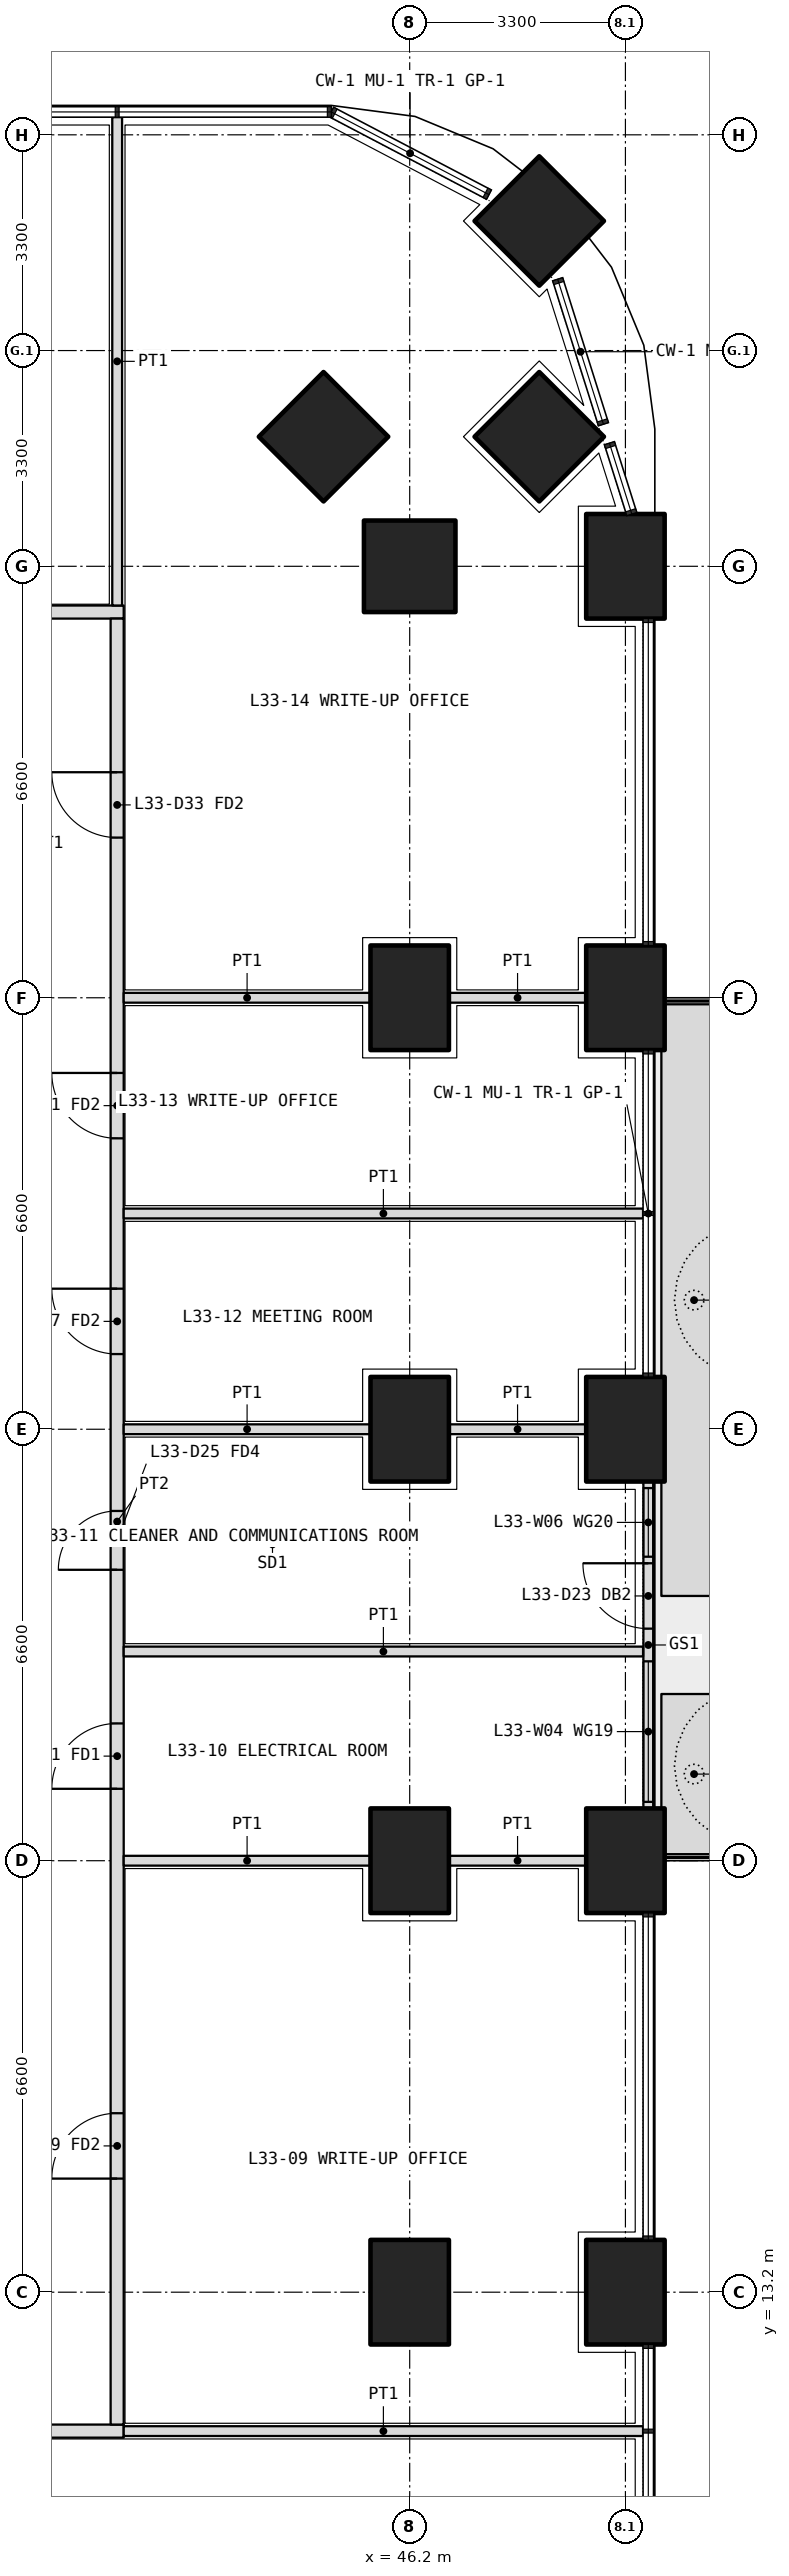
"""IFC4 building model, lengths in metres.
Left out: names, types, materials, properties, quantities, classifications, styles, units other than length and angle.
Written with IfcOpenShell. Run it as: python <this file> out.ifc"""

import sys

from ifc_helpers import new_model, si_unit, direction, frame, frame_2d, origin, origin_2d, place, context, subcontext, project, spatial, polyline, rectangle, outline, extrude, element, fill, save


model = new_model("IFC4")
c1 = context("Model", 3, precision=1e-05, world=origin(), true_north=direction((0.0, 1.0)))
c2 = subcontext(c1, "Body", "Model", "MODEL_VIEW")
j1 = project(units=[si_unit("LENGTHUNIT", "METRE"), si_unit("PLANEANGLEUNIT", "RADIAN")], contexts=[c1])
p1 = place(None, origin())
s1 = spatial("IfcSite", under=j1, at=p1, CompositionType="ELEMENT")
p2 = place(p1, origin())
s2 = spatial("IfcBuilding", under=s1, at=p2, CompositionType="ELEMENT")
p3 = place(p2, frame((0.0, 0.0, 145.2)))
s3 = spatial("IfcBuildingStorey", under=s2, at=p3, CompositionType="ELEMENT", Elevation=145.2)
p4 = place(p3, frame((48.182, 44.882, 0.0), z_axis=(0.0, 0.0, 1.0), x_axis=(0.707106781187, 0.707106781187, 0.0)))
e1 = element("IfcColumn", 1, at=p4, inside=s3, PredefinedType="COLUMN", context=c2, shape_type="SweptSolid", body=[
    extrude(rectangle(XDim=1.4, YDim=1.4, at=origin_2d()), origin(), (0.0, 0.0, 1.0), 4.2),
])
for number, where, z_axis, x_axis in (
    (2, (49.5, 13.2, 0.0), (0.0, 0.0, 1.0), (0.0, 1.0, 0.0)),
    (3, (49.5, 19.8, 0.0), (0.0, 0.0, 1.0), (0.0, 1.0, 0.0)),
    (4, (49.5, 26.4, 0.0), (0.0, 0.0, 1.0), (0.0, 1.0, 0.0)),
    (5, (49.5, 33.0, 0.0), (0.0, 0.0, 1.0), (0.0, 1.0, 0.0)),
    (6, (49.5, 39.6, 0.0), (0.0, 0.0, 1.0), (0.0, 1.0, 0.0)),
):
    element("IfcColumn", number, at=place(p3, frame(where, z_axis=z_axis, x_axis=x_axis)), inside=s3, PredefinedType="COLUMN", context=c2, shape_type="SweptSolid", body=[
        extrude(rectangle(XDim=1.6, YDim=1.2, at=origin_2d()), origin(), (0.0, 0.0, 1.0), 4.2),
    ])
for number, where, z_axis, x_axis in (
    (7, (46.2, 39.6, 0.0), (0.0, 0.0, 1.0), (1.0, 0.0, 0.0)),
    (8, (48.182, 41.582, 0.0), (0.0, 0.0, 1.0), (0.707, 0.707, 0.0)),
    (9, (44.882, 41.582, 0.0), (0.0, 0.0, 1.0), (0.707, 0.707, 0.0)),
):
    element("IfcColumn", number, at=place(p3, frame(where, z_axis=z_axis, x_axis=x_axis)), inside=s3, PredefinedType="COLUMN", context=c2, shape_type="SweptSolid", body=[
        extrude(rectangle(XDim=1.4, YDim=1.4, at=origin_2d()), origin(), (0.0, 0.0, 1.0), 4.2),
    ])
for number, where, z_axis, x_axis in (
    (10, (46.2, 13.2, 0.0), (0.0, 0.0, 1.0), (0.0, 1.0, 0.0)),
    (11, (46.2, 19.8, 0.0), (0.0, 0.0, 1.0), (0.0, 1.0, 0.0)),
    (12, (46.2, 26.4, 0.0), (0.0, 0.0, 1.0), (0.0, 1.0, 0.0)),
    (13, (46.2, 33.0, 0.0), (0.0, 0.0, 1.0), (0.0, 1.0, 0.0)),
):
    element("IfcColumn", number, at=place(p3, frame(where, z_axis=z_axis, x_axis=x_axis)), inside=s3, PredefinedType="COLUMN", context=c2, shape_type="SweptSolid", body=[
        extrude(rectangle(XDim=1.6, YDim=1.2, at=origin_2d()), origin(), (0.0, 0.0, 1.0), 4.2),
    ])
p5 = place(p3, origin())
e14 = element("IfcWall", 14, at=p5, inside=s3, PredefinedType="USERDEFINED", context=c2, shape_type="SweptSolid", body=[
    extrude(outline(polyline([(50.05, 19.9), (51.05, 19.9), (51.05, 22.35), (50.05, 22.35), (50.05, 19.9)]), holes=[polyline([(50.2, 20.05), (50.9, 20.05), (50.9, 22.2), (50.2, 22.2), (50.2, 20.05)])]), origin(), (0.0, 0.0, 1.0), 1.05),
])
p6 = place(p3, origin())
e15 = element("IfcWall", 15, at=p6, inside=s3, PredefinedType="USERDEFINED", context=c2, shape_type="SweptSolid", body=[
    extrude(outline(polyline([(50.05, 23.85), (51.05, 23.85), (51.05, 32.9), (50.05, 32.9), (50.05, 23.85)]), holes=[polyline([(50.2, 24.0), (50.9, 24.0), (50.9, 32.75), (50.2, 32.75), (50.2, 24.0)])]), origin(), (0.0, 0.0, 1.0), 1.05),
])
p7 = place(p3, frame((49.85, 20.6, 0.0), z_axis=(0.0, 0.0, 1.0), x_axis=(0.0, 1.0, 0.0)))
e16 = element("IfcWall", 16, at=p7, inside=s3, PredefinedType="SOLIDWALL", context=c2, shape_type="SweptSolid", body=[
    extrude(rectangle(XDim=5.0, YDim=0.15, at=frame_2d((2.5, 0.0))), origin(), (0.0, 0.0, 1.0), 2.05),
])
p8 = place(p7, frame((2.75, 0.0, 0.0)))
e17 = element("IfcOpeningElement", 17, at=p8, cuts=e16, PredefinedType="OPENING", context=c2, shape_type="SweptSolid", body=[
    extrude(rectangle(XDim=1.0, YDim=2.0, at=frame_2d((0.5, 1.0))), frame((0.0, 0.085, 0.0), z_axis=(0.0, -1.0, 0.0), x_axis=(1.0, 0.0, 0.0)), (0.0, 0.0, 1.0), 0.17),
])
p9 = place(p7, frame((0.1, 0.0, 0.1)))
e18 = element("IfcOpeningElement", 18, at=p9, cuts=e16, PredefinedType="OPENING", context=c2, shape_type="SweptSolid", body=[
    extrude(rectangle(XDim=2.15, YDim=1.65, at=frame_2d((1.075, 0.825))), frame((0.0, 0.085, 0.0), z_axis=(0.0, -1.0, 0.0), x_axis=(1.0, 0.0, 0.0)), (0.0, 0.0, 1.0), 0.17),
])
p10 = place(p7, frame((3.85, 0.0, 0.1)))
e19 = element("IfcOpeningElement", 19, at=p10, cuts=e16, PredefinedType="OPENING", context=c2, shape_type="SweptSolid", body=[
    extrude(rectangle(XDim=1.05, YDim=1.65, at=frame_2d((0.525, 0.825))), frame((0.0, 0.085, 0.0), z_axis=(0.0, -1.0, 0.0), x_axis=(1.0, 0.0, 0.0)), (0.0, 0.0, 1.0), 0.17),
])
p11 = place(p3, frame((10.975, 11.075, 0.0), z_axis=(0.0, 0.0, 1.0), x_axis=(1.0, 0.0, 0.0)))
e20 = element("IfcWall", 20, at=p11, inside=s3, PredefinedType="PARTITIONING", context=c2, shape_type="SweptSolid", body=[
    extrude(rectangle(XDim=30.85, YDim=0.2, at=frame_2d((15.425, 0.0))), origin(), (0.0, 0.0, 1.0), 2.55),
])
p12 = place(p11, frame((0.663, 0.0, 0.0)))
e21 = element("IfcOpeningElement", 21, at=p12, cuts=e20, PredefinedType="OPENING", context=c2, shape_type="SweptSolid", body=[
    extrude(rectangle(XDim=1.0, YDim=2.1, at=frame_2d((0.5, 1.05))), frame((0.0, 0.11, 0.0), z_axis=(0.0, -1.0, 0.0), x_axis=(1.0, 0.0, 0.0)), (0.0, 0.0, 1.0), 0.22),
])
p13 = place(p11, frame((3.825, 0.0, 0.0)))
e22 = element("IfcOpeningElement", 22, at=p13, cuts=e20, PredefinedType="OPENING", context=c2, shape_type="SweptSolid", body=[
    extrude(rectangle(XDim=1.0, YDim=2.1, at=frame_2d((0.5, 1.05))), frame((0.0, 0.11, 0.0), z_axis=(0.0, -1.0, 0.0), x_axis=(1.0, 0.0, 0.0)), (0.0, 0.0, 1.0), 0.22),
])
p14 = place(p11, frame((7.125, 0.0, 0.0)))
e23 = element("IfcOpeningElement", 23, at=p14, cuts=e20, PredefinedType="OPENING", context=c2, shape_type="SweptSolid", body=[
    extrude(rectangle(XDim=1.0, YDim=2.1, at=frame_2d((0.5, 1.05))), frame((0.0, 0.11, 0.0), z_axis=(0.0, -1.0, 0.0), x_axis=(1.0, 0.0, 0.0)), (0.0, 0.0, 1.0), 0.22),
])
p15 = place(p11, frame((19.188, 0.0, 0.0)))
e24 = element("IfcOpeningElement", 24, at=p15, cuts=e20, PredefinedType="OPENING", context=c2, shape_type="SweptSolid", body=[
    extrude(rectangle(XDim=1.2, YDim=2.1, at=frame_2d((0.6, 1.05))), frame((0.0, 0.11, 0.0), z_axis=(0.0, -1.0, 0.0), x_axis=(1.0, 0.0, 0.0)), (0.0, 0.0, 1.0), 0.22),
])
p16 = place(p3, frame((19.8, 38.9, 0.0), z_axis=(0.0, 0.0, 1.0), x_axis=(1.0, 0.0, 0.0)))
e25 = element("IfcWall", 25, at=p16, inside=s3, PredefinedType="PARTITIONING", context=c2, shape_type="SweptSolid", body=[
    extrude(rectangle(XDim=22.025, YDim=0.2, at=frame_2d((11.012, 0.0))), origin(), (0.0, 0.0, 1.0), 2.55),
])
p17 = place(p16, frame((6.1, 0.0, 0.0)))
e26 = element("IfcOpeningElement", 26, at=p17, cuts=e25, PredefinedType="OPENING", context=c2, shape_type="SweptSolid", body=[
    extrude(rectangle(XDim=1.0, YDim=2.1, at=frame_2d((0.5, 1.05))), frame((0.0, 0.11, 0.0), z_axis=(0.0, -1.0, 0.0), x_axis=(1.0, 0.0, 0.0)), (0.0, 0.0, 1.0), 0.22),
])
p18 = place(p16, frame((16.962, 0.0, 0.0)))
e27 = element("IfcOpeningElement", 27, at=p18, cuts=e25, PredefinedType="OPENING", context=c2, shape_type="SweptSolid", body=[
    extrude(rectangle(XDim=1.2, YDim=2.1, at=frame_2d((0.6, 1.05))), frame((0.0, 0.11, 0.0), z_axis=(0.0, -1.0, 0.0), x_axis=(1.0, 0.0, 0.0)), (0.0, 0.0, 1.0), 0.22),
])
p19 = place(p3, frame((41.725, 11.175, 0.0), z_axis=(0.0, 0.0, 1.0), x_axis=(0.0, 1.0, 0.0)))
e28 = element("IfcWall", 28, at=p19, inside=s3, PredefinedType="PARTITIONING", context=c2, shape_type="SweptSolid", body=[
    extrude(rectangle(XDim=27.625, YDim=0.2, at=frame_2d((13.812, 0.0))), origin(), (0.0, 0.0, 1.0), 2.55),
])
p20 = place(p19, frame((3.762, 0.0, 0.0)))
e29 = element("IfcOpeningElement", 29, at=p20, cuts=e28, PredefinedType="OPENING", context=c2, shape_type="SweptSolid", body=[
    extrude(rectangle(XDim=1.0, YDim=2.1, at=frame_2d((0.5, 1.05))), frame((0.0, 0.11, 0.0), z_axis=(0.0, -1.0, 0.0), x_axis=(1.0, 0.0, 0.0)), (0.0, 0.0, 1.0), 0.22),
])
p21 = place(p19, frame((9.725, 0.0, 0.0)))
e30 = element("IfcOpeningElement", 30, at=p21, cuts=e28, PredefinedType="OPENING", context=c2, shape_type="SweptSolid", body=[
    extrude(rectangle(XDim=1.0, YDim=2.1, at=frame_2d((0.5, 1.05))), frame((0.0, 0.11, 0.0), z_axis=(0.0, -1.0, 0.0), x_axis=(1.0, 0.0, 0.0)), (0.0, 0.0, 1.0), 0.22),
])
p22 = place(p19, frame((13.075, 0.0, 0.0)))
e31 = element("IfcOpeningElement", 31, at=p22, cuts=e28, PredefinedType="OPENING", context=c2, shape_type="SweptSolid", body=[
    extrude(rectangle(XDim=0.9, YDim=2.1, at=frame_2d((0.45, 1.05))), frame((0.0, 0.11, 0.0), z_axis=(0.0, -1.0, 0.0), x_axis=(1.0, 0.0, 0.0)), (0.0, 0.0, 1.0), 0.22),
])
p23 = place(p19, frame((16.375, 0.0, 0.0)))
e32 = element("IfcOpeningElement", 32, at=p23, cuts=e28, PredefinedType="OPENING", context=c2, shape_type="SweptSolid", body=[
    extrude(rectangle(XDim=1.0, YDim=2.1, at=frame_2d((0.5, 1.05))), frame((0.0, 0.11, 0.0), z_axis=(0.0, -1.0, 0.0), x_axis=(1.0, 0.0, 0.0)), (0.0, 0.0, 1.0), 0.22),
])
p24 = place(p19, frame((19.675, 0.0, 0.0)))
e33 = element("IfcOpeningElement", 33, at=p24, cuts=e28, PredefinedType="OPENING", context=c2, shape_type="SweptSolid", body=[
    extrude(rectangle(XDim=1.0, YDim=2.1, at=frame_2d((0.5, 1.05))), frame((0.0, 0.11, 0.0), z_axis=(0.0, -1.0, 0.0), x_axis=(1.0, 0.0, 0.0)), (0.0, 0.0, 1.0), 0.22),
])
p25 = place(p19, frame((24.275, 0.0, 0.0)))
e34 = element("IfcOpeningElement", 34, at=p25, cuts=e28, PredefinedType="OPENING", context=c2, shape_type="SweptSolid", body=[
    extrude(rectangle(XDim=1.0, YDim=2.1, at=frame_2d((0.5, 1.05))), frame((0.0, 0.11, 0.0), z_axis=(0.0, -1.0, 0.0), x_axis=(1.0, 0.0, 0.0)), (0.0, 0.0, 1.0), 0.22),
])
p26 = place(p3, frame((49.77, 11.075, 0.0), z_axis=(0.0, 0.0, 1.0), x_axis=(-1.0, 0.0, 0.0)))
e35 = element("IfcWall", 35, at=p26, inside=s3, PredefinedType="PARTITIONING", context=c2, shape_type="SweptSolid", body=[
    extrude(rectangle(XDim=7.945, YDim=0.15, at=frame_2d((3.973, 0.0))), origin(), (0.0, 0.0, 1.0), 3.85),
])
p27 = place(p3, frame((41.725, 46.47, 0.0), z_axis=(0.0, 0.0, 1.0), x_axis=(0.0, -1.0, 0.0)))
e36 = element("IfcWall", 36, at=p27, inside=s3, PredefinedType="PARTITIONING", context=c2, shape_type="SweptSolid", body=[
    extrude(rectangle(XDim=7.47, YDim=0.15, at=frame_2d((3.735, 0.0))), origin(), (0.0, 0.0, 1.0), 3.85),
])
p28 = place(p3, frame((49.77, 23.0, 0.0), z_axis=(0.0, 0.0, 1.0), x_axis=(-1.0, 0.0, 0.0)))
e37 = element("IfcWall", 37, at=p28, inside=s3, PredefinedType="PARTITIONING", context=c2, shape_type="SweptSolid", body=[
    extrude(rectangle(XDim=7.945, YDim=0.15, at=frame_2d((3.973, 0.0))), origin(), (0.0, 0.0, 1.0), 3.85),
])
p29 = place(p3, frame((48.9, 26.4, 0.0), z_axis=(0.0, 0.0, 1.0), x_axis=(-1.0, 0.0, 0.0)))
e38 = element("IfcWall", 38, at=p29, inside=s3, PredefinedType="PARTITIONING", context=c2, shape_type="SweptSolid", body=[
    extrude(rectangle(XDim=2.1, YDim=0.15, at=frame_2d((1.05, 0.0))), origin(), (0.0, 0.0, 1.0), 2.55),
])
p30 = place(p3, frame((45.6, 26.4, 0.0), z_axis=(0.0, 0.0, 1.0), x_axis=(-1.0, 0.0, 0.0)))
e39 = element("IfcWall", 39, at=p30, inside=s3, PredefinedType="PARTITIONING", context=c2, shape_type="SweptSolid", body=[
    extrude(rectangle(XDim=3.775, YDim=0.15, at=frame_2d((1.888, 0.0))), origin(), (0.0, 0.0, 1.0), 2.55),
])
p31 = place(p3, frame((48.9, 19.8, 0.0), z_axis=(0.0, 0.0, 1.0), x_axis=(-1.0, 0.0, 0.0)))
e40 = element("IfcWall", 40, at=p31, inside=s3, PredefinedType="PARTITIONING", context=c2, shape_type="SweptSolid", body=[
    extrude(rectangle(XDim=2.1, YDim=0.15, at=frame_2d((1.05, 0.0))), origin(), (0.0, 0.0, 1.0), 2.55),
])
p32 = place(p3, frame((45.6, 19.8, 0.0), z_axis=(0.0, 0.0, 1.0), x_axis=(-1.0, 0.0, 0.0)))
e41 = element("IfcWall", 41, at=p32, inside=s3, PredefinedType="PARTITIONING", context=c2, shape_type="SweptSolid", body=[
    extrude(rectangle(XDim=3.775, YDim=0.15, at=frame_2d((1.888, 0.0))), origin(), (0.0, 0.0, 1.0), 2.55),
])
p33 = place(p3, frame((49.77, 29.7, 0.0), z_axis=(0.0, 0.0, 1.0), x_axis=(-1.0, 0.0, 0.0)))
e42 = element("IfcWall", 42, at=p33, inside=s3, PredefinedType="PARTITIONING", context=c2, shape_type="SweptSolid", body=[
    extrude(rectangle(XDim=7.945, YDim=0.15, at=frame_2d((3.973, 0.0))), origin(), (0.0, 0.0, 1.0), 3.85),
])
p34 = place(p3, frame((48.9, 33.0, 0.0), z_axis=(0.0, 0.0, 1.0), x_axis=(-1.0, 0.0, 0.0)))
e43 = element("IfcWall", 43, at=p34, inside=s3, PredefinedType="PARTITIONING", context=c2, shape_type="SweptSolid", body=[
    extrude(rectangle(XDim=2.1, YDim=0.15, at=frame_2d((1.05, 0.0))), origin(), (0.0, 0.0, 1.0), 2.55),
])
p35 = place(p3, frame((45.6, 33.0, 0.0), z_axis=(0.0, 0.0, 1.0), x_axis=(-1.0, 0.0, 0.0)))
e44 = element("IfcWall", 44, at=p35, inside=s3, PredefinedType="PARTITIONING", context=c2, shape_type="SweptSolid", body=[
    extrude(rectangle(XDim=3.775, YDim=0.15, at=frame_2d((1.888, 0.0))), origin(), (0.0, 0.0, 1.0), 2.55),
])
p36 = place(p8, origin())
e45 = element("IfcDoor", 45, at=p36, inside=s3, OperationType="SINGLE_SWING_RIGHT", PredefinedType="DOOR", context=c2, shape_type="SweptSolid", body=[
    extrude(rectangle(XDim=1.0, YDim=2.0, at=frame_2d((0.5, 1.0))), frame((0.0, 0.025, 0.0), z_axis=(0.0, -1.0, 0.0), x_axis=(1.0, 0.0, 0.0)), (0.0, 0.0, 1.0), 0.05),
])
fill(e17, e45)
p37 = place(p9, origin())
e46 = element("IfcWindow", 46, at=p37, inside=s3, PartitioningType="SINGLE_PANEL", PredefinedType="WINDOW", context=c2, shape_type="SweptSolid", body=[
    extrude(rectangle(XDim=2.15, YDim=1.65, at=frame_2d((1.075, 0.825))), frame((0.0, 0.03, 0.0), z_axis=(0.0, -1.0, 0.0), x_axis=(1.0, 0.0, 0.0)), (0.0, 0.0, 1.0), 0.06),
])
fill(e18, e46)
p38 = place(p10, origin())
e47 = element("IfcWindow", 47, at=p38, inside=s3, PartitioningType="SINGLE_PANEL", PredefinedType="WINDOW", context=c2, shape_type="SweptSolid", body=[
    extrude(rectangle(XDim=1.05, YDim=1.65, at=frame_2d((0.525, 0.825))), frame((0.0, 0.03, 0.0), z_axis=(0.0, -1.0, 0.0), x_axis=(1.0, 0.0, 0.0)), (0.0, 0.0, 1.0), 0.06),
])
fill(e19, e47)
p39 = place(p20, origin())
e48 = element("IfcDoor", 48, at=p39, inside=s3, OperationType="SINGLE_SWING_LEFT", PredefinedType="DOOR", context=c2, shape_type="SweptSolid", body=[
    extrude(rectangle(XDim=1.0, YDim=2.1, at=frame_2d((0.5, 1.05))), frame((0.0, 0.025, 0.0), z_axis=(0.0, -1.0, 0.0), x_axis=(1.0, 0.0, 0.0)), (0.0, 0.0, 1.0), 0.05),
])
fill(e29, e48)
p40 = place(p21, origin())
e49 = element("IfcDoor", 49, at=p40, inside=s3, OperationType="SINGLE_SWING_LEFT", PredefinedType="DOOR", context=c2, shape_type="SweptSolid", body=[
    extrude(rectangle(XDim=1.0, YDim=2.1, at=frame_2d((0.5, 1.05))), frame((0.0, 0.025, 0.0), z_axis=(0.0, -1.0, 0.0), x_axis=(1.0, 0.0, 0.0)), (0.0, 0.0, 1.0), 0.05),
])
fill(e30, e49)
p41 = place(p22, origin())
e50 = element("IfcDoor", 50, at=p41, inside=s3, OperationType="SINGLE_SWING_LEFT", PredefinedType="DOOR", context=c2, shape_type="SweptSolid", body=[
    extrude(rectangle(XDim=0.9, YDim=2.1, at=frame_2d((0.45, 1.05))), frame((0.0, 0.025, 0.0), z_axis=(0.0, -1.0, 0.0), x_axis=(1.0, 0.0, 0.0)), (0.0, 0.0, 1.0), 0.05),
])
fill(e31, e50)
p42 = place(p23, origin())
e51 = element("IfcDoor", 51, at=p42, inside=s3, OperationType="SINGLE_SWING_RIGHT", PredefinedType="DOOR", context=c2, shape_type="SweptSolid", body=[
    extrude(rectangle(XDim=1.0, YDim=2.1, at=frame_2d((0.5, 1.05))), frame((0.0, 0.025, 0.0), z_axis=(0.0, -1.0, 0.0), x_axis=(1.0, 0.0, 0.0)), (0.0, 0.0, 1.0), 0.05),
])
fill(e32, e51)
p43 = place(p24, origin())
e52 = element("IfcDoor", 52, at=p43, inside=s3, OperationType="SINGLE_SWING_RIGHT", PredefinedType="DOOR", context=c2, shape_type="SweptSolid", body=[
    extrude(rectangle(XDim=1.0, YDim=2.1, at=frame_2d((0.5, 1.05))), frame((0.0, 0.025, 0.0), z_axis=(0.0, -1.0, 0.0), x_axis=(1.0, 0.0, 0.0)), (0.0, 0.0, 1.0), 0.05),
])
fill(e33, e52)
p44 = place(p25, origin())
e53 = element("IfcDoor", 53, at=p44, inside=s3, OperationType="SINGLE_SWING_RIGHT", PredefinedType="DOOR", context=c2, shape_type="SweptSolid", body=[
    extrude(rectangle(XDim=1.0, YDim=2.1, at=frame_2d((0.5, 1.05))), frame((0.0, 0.025, 0.0), z_axis=(0.0, -1.0, 0.0), x_axis=(1.0, 0.0, 0.0)), (0.0, 0.0, 1.0), 0.05),
])
fill(e34, e53)
save(model, sys.argv[1])
